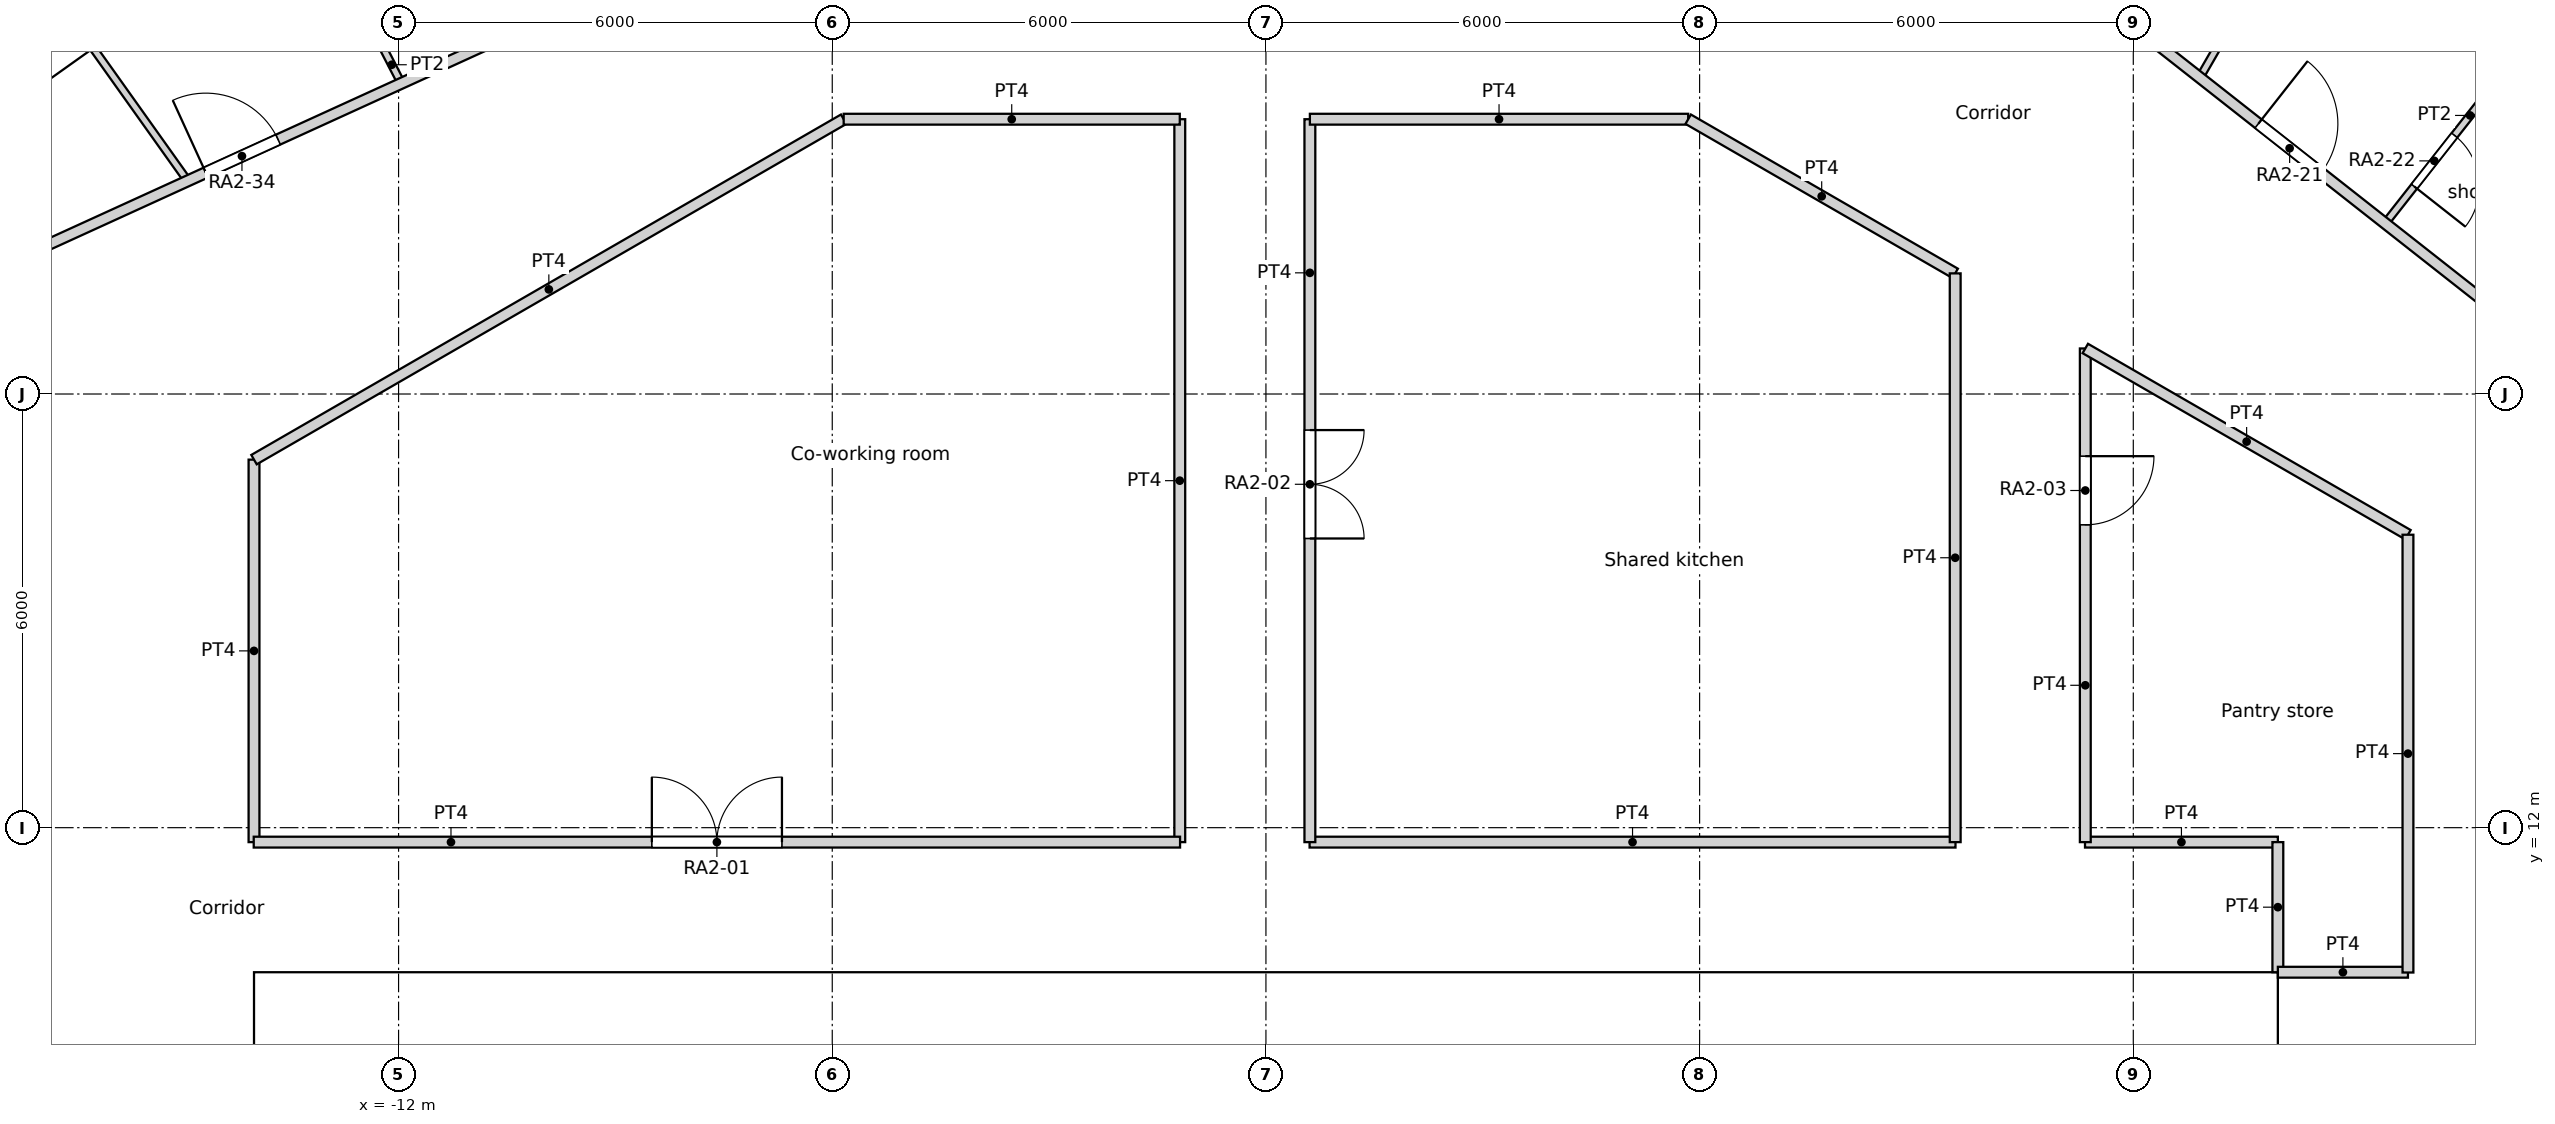
"""IFC4 building model, lengths in metres.
Left out: names, types, materials, properties, quantities, classifications, styles, units other than length and angle.
Written with IfcOpenShell. Run it as: python <this file> out.ifc"""

import sys

from ifc_helpers import new_model, si_unit, direction, frame, frame_2d, origin, origin_2d, place, context, subcontext, project, spatial, rectangle, circle, extrude, element, fill, save


model = new_model("IFC4")
c1 = context("Model", 3, precision=1e-05, world=origin(), true_north=direction((0.0, 1.0)))
c2 = subcontext(c1, "Body", "Model", "MODEL_VIEW")
j1 = project(units=[si_unit("LENGTHUNIT", "METRE"), si_unit("PLANEANGLEUNIT", "RADIAN")], contexts=[c1])
p1 = place(None, origin())
s1 = spatial("IfcSite", under=j1, at=p1, CompositionType="ELEMENT")
p2 = place(p1, origin())
s2 = spatial("IfcBuilding", under=s1, at=p2, CompositionType="ELEMENT")
p3 = place(p2, frame((0.0, 0.0, 39.0)))
s3 = spatial("IfcBuildingStorey", under=s2, at=p3, CompositionType="ELEMENT", Elevation=39.0)
for number, where, z_axis, x_axis in (
    (1, (14.659, 19.69, 0.0), (0.0, 0.0, 1.0), (1.0, 0.0, 0.0)),
    (2, (9.723, 22.54, 0.0), (0.0, 0.0, 1.0), (1.0, 0.0, 0.0)),
    (3, (-12.274, 21.259, 0.0), (0.0, 0.0, 1.0), (1.0, 0.0, 0.0)),
    (4, (-16.846, 17.855, 0.0), (0.0, 0.0, 1.0), (1.0, 0.0, 0.0)),
):
    element("IfcColumn", number, at=place(p3, frame(where, z_axis=z_axis, x_axis=x_axis)), inside=s3, PredefinedType="COLUMN", context=c2, shape_type="SweptSolid", body=[
        extrude(circle(Radius=0.75, at=origin_2d()), origin(), (0.0, 0.0, 1.0), 3.6),
    ])
for number, where, z_axis, x_axis in (
    (5, (15.552, 10.603, 0.0), (0.0, 0.0, 1.0), (1.0, 0.0, 0.0)),
    (6, (11.735, 14.716, 0.0), (0.0, 0.0, 1.0), (1.0, 0.0, 0.0)),
    (7, (6.876, 17.521, 0.0), (0.0, 0.0, 1.0), (1.0, 0.0, 0.0)),
    (8, (1.406, 18.77, 0.0), (0.0, 0.0, 1.0), (1.0, 0.0, 0.0)),
    (9, (-4.188, 18.35, 0.0), (0.0, 0.0, 1.0), (1.0, 0.0, 0.0)),
    (10, (-9.411, 16.301, 0.0), (0.0, 0.0, 1.0), (1.0, 0.0, 0.0)),
    (11, (-13.798, 12.802, 0.0), (0.0, 0.0, 1.0), (1.0, 0.0, 0.0)),
):
    element("IfcColumn", number, at=place(p3, frame(where, z_axis=z_axis, x_axis=x_axis)), inside=s3, PredefinedType="COLUMN", context=c2, shape_type="SweptSolid", body=[
        extrude(circle(Radius=0.8, at=origin_2d()), origin(), (0.0, 0.0, 1.0), 3.6),
    ])
p4 = place(p3, frame((-14.0, 9.4, 0.0), z_axis=(0.0, 0.0, 1.0), x_axis=(1.0, 0.0, 0.0)))
e12 = element("IfcWall", 12, at=p4, inside=s3, PredefinedType="SOLIDWALL", context=c2, shape_type="SweptSolid", body=[
    extrude(rectangle(XDim=28.0, YDim=1.2, at=frame_2d((14.0, 0.0))), origin(), (0.0, 0.0, 1.0), 3.6),
])
p5 = place(p4, frame((9.8, 0.0, 0.0)))
e13 = element("IfcOpeningElement", 13, at=p5, cuts=e12, PredefinedType="OPENING", context=c2, shape_type="SweptSolid", body=[
    extrude(rectangle(XDim=1.8, YDim=2.1, at=frame_2d((0.9, 1.05))), frame((0.0, 0.6, 0.0), z_axis=(0.0, -1.0, 0.0), x_axis=(1.0, 0.0, 0.0)), (0.0, 0.0, 1.0), 1.2),
])
p6 = place(p3, frame((-14.004, 11.8, 0.0), z_axis=(0.0, 0.0, 1.0), x_axis=(1.0, 0.0, 0.0)))
e14 = element("IfcWall", 14, at=p6, inside=s3, PredefinedType="PARTITIONING", context=c2, shape_type="SweptSolid", body=[
    extrude(rectangle(XDim=12.816, YDim=0.15, at=frame_2d((6.408, 0.0))), origin(), (0.0, 0.0, 1.0), 3.15),
])
p7 = place(p6, frame((5.508, 0.0, 0.0)))
e15 = element("IfcOpeningElement", 15, at=p7, cuts=e14, PredefinedType="OPENING", context=c2, shape_type="SweptSolid", body=[
    extrude(rectangle(XDim=1.8, YDim=2.1, at=frame_2d((0.9, 1.05))), frame((0.0, 0.075, 0.0), z_axis=(0.0, -1.0, 0.0), x_axis=(1.0, 0.0, 0.0)), (0.0, 0.0, 1.0), 0.15),
])
p8 = place(p3, frame((0.604, 11.8, 0.0), z_axis=(0.0, 0.0, 1.0), x_axis=(1.0, 0.0, 0.0)))
e16 = element("IfcWall", 16, at=p8, inside=s3, PredefinedType="PARTITIONING", context=c2, shape_type="SweptSolid", body=[
    extrude(rectangle(XDim=8.936, YDim=0.15, at=frame_2d((4.468, 0.0))), origin(), (0.0, 0.0, 1.0), 3.15),
])
p9 = place(p3, frame((11.332, 11.8, 0.0), z_axis=(0.0, 0.0, 1.0), x_axis=(1.0, 0.0, 0.0)))
e17 = element("IfcWall", 17, at=p9, inside=s3, PredefinedType="PARTITIONING", context=c2, shape_type="SweptSolid", body=[
    extrude(rectangle(XDim=2.668, YDim=0.15, at=frame_2d((1.334, 0.0))), origin(), (0.0, 0.0, 1.0), 3.15),
])
for number, where, z_axis, x_axis in (
    (18, (14.0, 10.0, 0.0), (0.0, 0.0, 1.0), (0.0, 1.0, 0.0)),
    (19, (14.0, 10.0, 0.0), (0.0, 0.0, 1.0), (1.0, 0.0, 0.0)),
):
    element("IfcWall", number, at=place(p3, frame(where, z_axis=z_axis, x_axis=x_axis)), inside=s3, PredefinedType="PARTITIONING", context=c2, shape_type="SweptSolid", body=[
        extrude(rectangle(XDim=1.8, YDim=0.15, at=frame_2d((0.9, 0.0))), origin(), (0.0, 0.0, 1.0), 3.15),
    ])
p10 = place(p3, frame((15.8, 9.996, 0.0), z_axis=(0.0, 0.0, 1.0), x_axis=(0.0, 1.0, 0.0)))
e20 = element("IfcWall", 20, at=p10, inside=s3, PredefinedType="PARTITIONING", context=c2, shape_type="SweptSolid", body=[
    extrude(rectangle(XDim=6.057, YDim=0.15, at=frame_2d((3.028, 0.0))), origin(), (0.0, 0.0, 1.0), 3.15),
])
p11 = place(p3, frame((10.933, 23.94, 0.0), z_axis=(0.0, 0.0, 1.0), x_axis=(0.786069782367, -0.618137765591, 0.0)))
e21 = element("IfcWall", 21, at=p11, inside=s3, PredefinedType="PARTITIONING", context=c2, shape_type="SweptSolid", body=[
    extrude(rectangle(XDim=12.41, YDim=0.15, at=frame_2d((6.205, 0.0))), origin(), (0.0, 0.0, 1.0), 3.15),
])
p12 = place(p11, frame((3.559, 0.0, 0.0)))
e22 = element("IfcOpeningElement", 22, at=p12, cuts=e21, PredefinedType="OPENING", context=c2, shape_type="SweptSolid", body=[
    extrude(rectangle(XDim=1.1, YDim=2.1, at=frame_2d((0.55, 1.05))), frame((0.0, 0.075, 0.0), z_axis=(0.0, -1.0, 0.0), x_axis=(1.0, 0.0, 0.0)), (0.0, 0.0, 1.0), 0.15),
])
p13 = place(p3, frame((-1.192, 11.8, 0.0), z_axis=(0.0, 0.0, 1.0), x_axis=(0.0, 1.0, 0.0)))
e23 = element("IfcWall", 23, at=p13, inside=s3, PredefinedType="PARTITIONING", context=c2, shape_type="SweptSolid", body=[
    extrude(rectangle(XDim=10.002, YDim=0.15, at=frame_2d((5.001, 0.0))), origin(), (0.0, 0.0, 1.0), 3.15),
])
p14 = place(p3, frame((-5.842, 21.802, 0.0), z_axis=(0.0, 0.0, 1.0), x_axis=(1.0, 0.0, 0.0)))
e24 = element("IfcWall", 24, at=p14, inside=s3, PredefinedType="PARTITIONING", context=c2, shape_type="SweptSolid", body=[
    extrude(rectangle(XDim=4.65, YDim=0.15, at=frame_2d((2.325, 0.0))), origin(), (0.0, 0.0, 1.0), 3.15),
])
p15 = place(p3, frame((-14.0, 17.092, 0.0), z_axis=(0.0, 0.0, 1.0), x_axis=(0.86602719091, 0.499996904595, 0.0)))
e25 = element("IfcWall", 25, at=p15, inside=s3, PredefinedType="PARTITIONING", context=c2, shape_type="SweptSolid", body=[
    extrude(rectangle(XDim=9.42, YDim=0.15, at=frame_2d((4.71, 0.0))), origin(), (0.0, 0.0, 1.0), 3.15),
])
p16 = place(p3, frame((-14.0, 11.8, 0.0), z_axis=(0.0, 0.0, 1.0), x_axis=(0.0, 1.0, 0.0)))
e26 = element("IfcWall", 26, at=p16, inside=s3, PredefinedType="PARTITIONING", context=c2, shape_type="SweptSolid", body=[
    extrude(rectangle(XDim=5.292, YDim=0.15, at=frame_2d((2.646, 0.0))), origin(), (0.0, 0.0, 1.0), 3.15),
])
p17 = place(p3, frame((9.536, 11.8, 0.0), z_axis=(0.0, 0.0, 1.0), x_axis=(0.0, 1.0, 0.0)))
e27 = element("IfcWall", 27, at=p17, inside=s3, PredefinedType="PARTITIONING", context=c2, shape_type="SweptSolid", body=[
    extrude(rectangle(XDim=7.869, YDim=0.15, at=frame_2d((3.935, 0.0))), origin(), (0.0, 0.0, 1.0), 3.15),
])
p18 = place(p3, frame((5.842, 21.802, 0.0), z_axis=(0.0, 0.0, 1.0), x_axis=(0.865983505205, -0.500072563448, 0.0)))
e28 = element("IfcWall", 28, at=p18, inside=s3, PredefinedType="PARTITIONING", context=c2, shape_type="SweptSolid", body=[
    extrude(rectangle(XDim=4.265, YDim=0.15, at=frame_2d((2.133, 0.0))), origin(), (0.0, 0.0, 1.0), 3.15),
])
p19 = place(p3, frame((0.608, 21.802, 0.0), z_axis=(0.0, 0.0, 1.0), x_axis=(1.0, 0.0, 0.0)))
e29 = element("IfcWall", 29, at=p19, inside=s3, PredefinedType="PARTITIONING", context=c2, shape_type="SweptSolid", body=[
    extrude(rectangle(XDim=5.234, YDim=0.15, at=frame_2d((2.617, 0.0))), origin(), (0.0, 0.0, 1.0), 3.15),
])
p20 = place(p3, frame((0.608, 11.8, 0.0), z_axis=(0.0, 0.0, 1.0), x_axis=(0.0, 1.0, 0.0)))
e30 = element("IfcWall", 30, at=p20, inside=s3, PredefinedType="PARTITIONING", context=c2, shape_type="SweptSolid", body=[
    extrude(rectangle(XDim=10.002, YDim=0.15, at=frame_2d((5.001, 0.0))), origin(), (0.0, 0.0, 1.0), 3.15),
])
p21 = place(p20, frame((4.201, 0.0, 0.0)))
e31 = element("IfcOpeningElement", 31, at=p21, cuts=e30, PredefinedType="OPENING", context=c2, shape_type="SweptSolid", body=[
    extrude(rectangle(XDim=1.5, YDim=2.1, at=frame_2d((0.75, 1.05))), frame((0.0, 0.075, 0.0), z_axis=(0.0, -1.0, 0.0), x_axis=(1.0, 0.0, 0.0)), (0.0, 0.0, 1.0), 0.15),
])
p22 = place(p3, frame((11.336, 18.63, 0.0), z_axis=(0.0, 0.0, 1.0), x_axis=(0.866063337164, -0.499934291702, 0.0)))
e32 = element("IfcWall", 32, at=p22, inside=s3, PredefinedType="PARTITIONING", context=c2, shape_type="SweptSolid", body=[
    extrude(rectangle(XDim=5.155, YDim=0.15, at=frame_2d((2.577, 0.0))), origin(), (0.0, 0.0, 1.0), 3.15),
])
p23 = place(p3, frame((11.336, 11.8, 0.0), z_axis=(0.0, 0.0, 1.0), x_axis=(0.0, 1.0, 0.0)))
e33 = element("IfcWall", 33, at=p23, inside=s3, PredefinedType="PARTITIONING", context=c2, shape_type="SweptSolid", body=[
    extrude(rectangle(XDim=6.83, YDim=0.15, at=frame_2d((3.415, 0.0))), origin(), (0.0, 0.0, 1.0), 3.15),
])
p24 = place(p23, frame((4.39, 0.0, 0.0)))
e34 = element("IfcOpeningElement", 34, at=p24, cuts=e33, PredefinedType="OPENING", context=c2, shape_type="SweptSolid", body=[
    extrude(rectangle(XDim=0.95, YDim=2.1, at=frame_2d((0.475, 1.05))), frame((0.0, 0.075, 0.0), z_axis=(0.0, -1.0, 0.0), x_axis=(1.0, 0.0, 0.0)), (0.0, 0.0, 1.0), 0.15),
])
p25 = place(p3, frame((-17.235, 19.89, 0.0), z_axis=(0.0, 0.0, 1.0), x_axis=(0.909655192768, 0.415364213999, 0.0)))
e35 = element("IfcWall", 35, at=p25, inside=s3, PredefinedType="PARTITIONING", context=c2, shape_type="SweptSolid", body=[
    extrude(rectangle(XDim=10.328, YDim=0.15, at=frame_2d((5.164, 0.0))), origin(), (0.0, 0.0, 1.0), 3.15),
])
p26 = place(p25, frame((2.823, 0.0, 0.0)))
e36 = element("IfcOpeningElement", 36, at=p26, cuts=e35, PredefinedType="OPENING", context=c2, shape_type="SweptSolid", body=[
    extrude(rectangle(XDim=1.1, YDim=2.1, at=frame_2d((0.55, 1.05))), frame((0.0, 0.075, 0.0), z_axis=(0.0, -1.0, 0.0), x_axis=(1.0, 0.0, 0.0)), (0.0, 0.0, 1.0), 0.15),
])
p27 = place(p3, frame((15.485, 20.361, 0.0), z_axis=(0.0, 0.0, 1.0), x_axis=(0.618203810204, 0.786017842704, 0.0)))
e37 = element("IfcWall", 37, at=p27, inside=s3, PredefinedType="PARTITIONING", context=c2, shape_type="SweptSolid", body=[
    extrude(rectangle(XDim=2.2, YDim=0.1, at=frame_2d((1.1, 0.0))), origin(), (0.0, 0.0, 1.0), 3.15),
])
p28 = place(p27, frame((0.65, 0.0, 0.0)))
e38 = element("IfcOpeningElement", 38, at=p28, cuts=e37, PredefinedType="OPENING", context=c2, shape_type="SweptSolid", body=[
    extrude(rectangle(XDim=0.9, YDim=2.0, at=frame_2d((0.45, 1.0))), frame((0.0, 0.05, 0.0), z_axis=(0.0, -1.0, 0.0), x_axis=(1.0, 0.0, 0.0)), (0.0, 0.0, 1.0), 0.1),
])
p29 = place(p3, frame((12.92, 22.378, 0.0), z_axis=(0.0, 0.0, 1.0), x_axis=(0.49998673258, 0.866033063597, 0.0)))
e39 = element("IfcWall", 39, at=p29, inside=s3, PredefinedType="PARTITIONING", context=c2, shape_type="SweptSolid", body=[
    extrude(rectangle(XDim=5.385, YDim=0.1, at=frame_2d((2.692, 0.0))), origin(), (0.0, 0.0, 1.0), 3.15),
])
p30 = place(p29, frame((2.446, 0.0, 0.0)))
e40 = element("IfcOpeningElement", 40, at=p30, cuts=e39, PredefinedType="OPENING", context=c2, shape_type="SweptSolid", body=[
    extrude(rectangle(XDim=0.9, YDim=2.1, at=frame_2d((0.45, 1.05))), frame((0.0, 0.05, 0.0), z_axis=(0.0, -1.0, 0.0), x_axis=(1.0, 0.0, 0.0)), (0.0, 0.0, 1.0), 0.1),
])
p31 = place(p3, frame((-18.112, 25.435, 0.0), z_axis=(0.0, 0.0, 1.0), x_axis=(0.580004598464, -0.81461320009, 0.0)))
e41 = element("IfcWall", 41, at=p31, inside=s3, PredefinedType="PARTITIONING", context=c2, shape_type="SweptSolid", body=[
    extrude(rectangle(XDim=5.507, YDim=0.1, at=frame_2d((2.753, 0.0))), origin(), (0.0, 0.0, 1.0), 3.15),
])
p32 = place(p31, frame((2.254, 0.0, 0.0)))
e42 = element("IfcOpeningElement", 42, at=p32, cuts=e41, PredefinedType="OPENING", context=c2, shape_type="SweptSolid", body=[
    extrude(rectangle(XDim=1.0, YDim=2.04, at=frame_2d((0.5, 1.02))), frame((0.0, 0.05, 0.0), z_axis=(0.0, -1.0, 0.0), x_axis=(1.0, 0.0, 0.0)), (0.0, 0.0, 1.0), 0.1),
])
p33 = place(p3, frame((-12.949, 24.214, 0.0), z_axis=(0.0, 0.0, 1.0), x_axis=(0.458149254338, -0.888875278512, 0.0)))
e43 = element("IfcWall", 43, at=p33, inside=s3, PredefinedType="PARTITIONING", context=c2, shape_type="SweptSolid", body=[
    extrude(rectangle(XDim=2.155, YDim=0.1, at=frame_2d((1.077, 0.0))), origin(), (0.0, 0.0, 1.0), 3.15),
])
p34 = place(p33, frame((0.627, 0.0, 0.0)))
e44 = element("IfcOpeningElement", 44, at=p34, cuts=e43, PredefinedType="OPENING", context=c2, shape_type="SweptSolid", body=[
    extrude(rectangle(XDim=0.9, YDim=2.0, at=frame_2d((0.45, 1.0))), frame((0.0, 0.05, 0.0), z_axis=(0.0, -1.0, 0.0), x_axis=(1.0, 0.0, 0.0)), (0.0, 0.0, 1.0), 0.1),
])
p35 = place(p5, origin())
e45 = element("IfcDoor", 45, at=p35, inside=s3, OperationType="DOUBLE_DOOR_SINGLE_SWING", PredefinedType="DOOR", context=c2, shape_type="SweptSolid", body=[
    extrude(rectangle(XDim=1.8, YDim=2.1, at=frame_2d((0.9, 1.05))), frame((0.0, 0.025, 0.0), z_axis=(0.0, -1.0, 0.0), x_axis=(1.0, 0.0, 0.0)), (0.0, 0.0, 1.0), 0.05),
])
fill(e13, e45)
p36 = place(p7, origin())
e46 = element("IfcDoor", 46, at=p36, inside=s3, OperationType="DOUBLE_DOOR_SINGLE_SWING", PredefinedType="DOOR", context=c2, shape_type="SweptSolid", body=[
    extrude(rectangle(XDim=1.8, YDim=2.1, at=frame_2d((0.9, 1.05))), frame((0.0, 0.025, 0.0), z_axis=(0.0, -1.0, 0.0), x_axis=(1.0, 0.0, 0.0)), (0.0, 0.0, 1.0), 0.05),
])
fill(e15, e46)
p37 = place(p21, origin())
e47 = element("IfcDoor", 47, at=p37, inside=s3, OperationType="DOUBLE_DOOR_SINGLE_SWING", PredefinedType="DOOR", context=c2, shape_type="SweptSolid", body=[
    extrude(rectangle(XDim=1.5, YDim=2.1, at=frame_2d((0.75, 1.05))), frame((0.0, 0.025, 0.0), z_axis=(0.0, -1.0, 0.0), x_axis=(1.0, 0.0, 0.0)), (0.0, 0.0, 1.0), 0.05),
])
fill(e31, e47)
p38 = place(p24, origin())
e48 = element("IfcDoor", 48, at=p38, inside=s3, OperationType="SINGLE_SWING_LEFT", PredefinedType="DOOR", context=c2, shape_type="SweptSolid", body=[
    extrude(rectangle(XDim=0.95, YDim=2.1, at=frame_2d((0.475, 1.05))), frame((0.0, 0.025, 0.0), z_axis=(0.0, -1.0, 0.0), x_axis=(1.0, 0.0, 0.0)), (0.0, 0.0, 1.0), 0.05),
])
fill(e34, e48)
p39 = place(p12, origin())
e49 = element("IfcDoor", 49, at=p39, inside=s3, OperationType="SINGLE_SWING_LEFT", PredefinedType="DOOR", context=c2, shape_type="SweptSolid", body=[
    extrude(rectangle(XDim=1.1, YDim=2.1, at=frame_2d((0.55, 1.05))), frame((0.0, 0.025, 0.0), z_axis=(0.0, -1.0, 0.0), x_axis=(1.0, 0.0, 0.0)), (0.0, 0.0, 1.0), 0.05),
])
fill(e22, e49)
p40 = place(p28, origin())
e50 = element("IfcDoor", 50, at=p40, inside=s3, OperationType="SINGLE_SWING_RIGHT", PredefinedType="DOOR", context=c2, shape_type="SweptSolid", body=[
    extrude(rectangle(XDim=0.9, YDim=2.0, at=frame_2d((0.45, 1.0))), frame((0.0, 0.025, 0.0), z_axis=(0.0, -1.0, 0.0), x_axis=(1.0, 0.0, 0.0)), (0.0, 0.0, 1.0), 0.05),
])
fill(e38, e50)
p41 = place(p26, origin())
e51 = element("IfcDoor", 51, at=p41, inside=s3, OperationType="SINGLE_SWING_LEFT", PredefinedType="DOOR", context=c2, shape_type="SweptSolid", body=[
    extrude(rectangle(XDim=1.1, YDim=2.1, at=frame_2d((0.55, 1.05))), frame((0.0, 0.025, 0.0), z_axis=(0.0, -1.0, 0.0), x_axis=(1.0, 0.0, 0.0)), (0.0, 0.0, 1.0), 0.05),
])
fill(e36, e51)
save(model, sys.argv[1])
